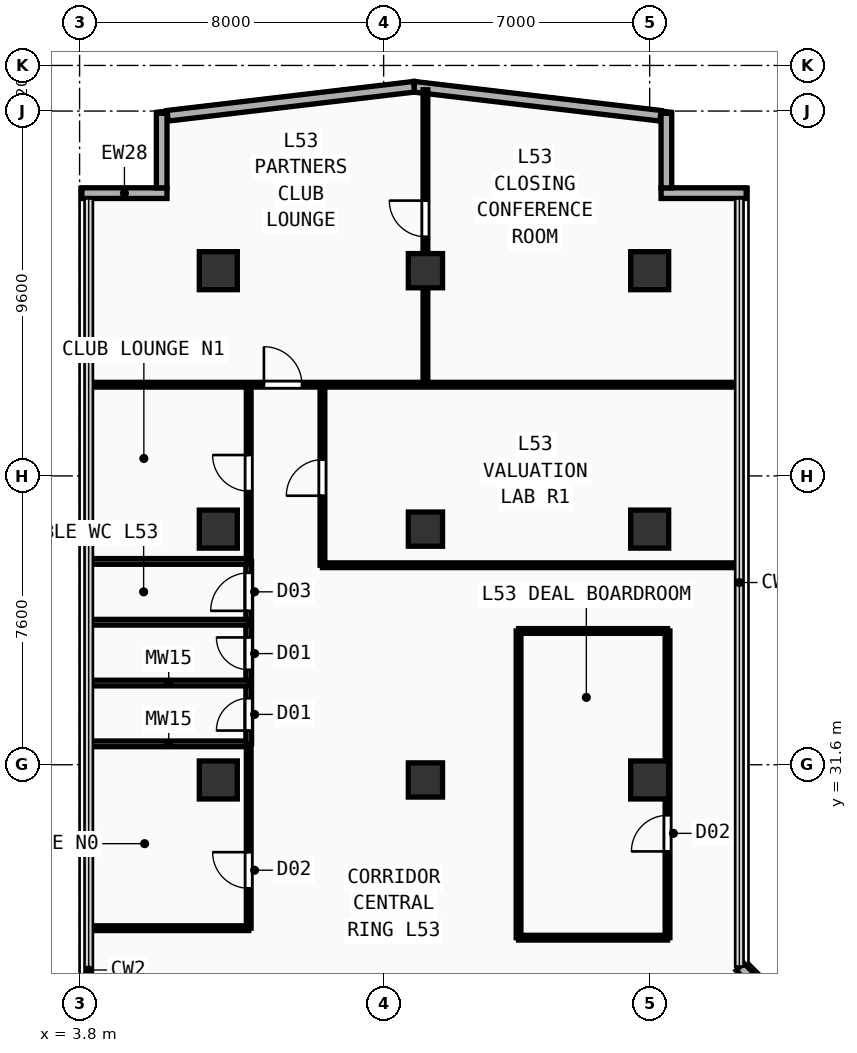
"""IFC4 building model, lengths in metres.
Left out: names, types, materials, properties, quantities, classifications, styles, units other than length and angle.
Written with IfcOpenShell. Run it as: python <this file> out.ifc"""

import sys

from ifc_helpers import new_model, si_unit, direction, frame, frame_2d, origin, origin_2d, place, context, subcontext, project, spatial, rectangle, extrude, element, fill, save


model = new_model("IFC4")
c1 = context("Model", 3, precision=1e-05, world=origin(), true_north=direction((0.0, 1.0)))
c2 = subcontext(c1, "Body", "Model", "MODEL_VIEW")
j1 = project(units=[si_unit("LENGTHUNIT", "METRE"), si_unit("PLANEANGLEUNIT", "RADIAN")], contexts=[c1])
p1 = place(None, origin())
s1 = spatial("IfcSite", under=j1, at=p1, CompositionType="ELEMENT")
p2 = place(p1, origin())
s2 = spatial("IfcBuilding", under=s1, at=p2, CompositionType="ELEMENT")
p3 = place(p2, frame((0.0, 0.0, 208.3)))
s3 = spatial("IfcBuildingStorey", under=s2, at=p3, CompositionType="ELEMENT", Elevation=208.3)
for number, where, z_axis, x_axis in (
    (1, (7.45, 31.2, 0.0), (0.0, 0.0, 1.0), (1.0, 0.0, 0.0)),
    (2, (7.45, 37.8, 0.0), (0.0, 0.0, 1.0), (1.0, 0.0, 0.0)),
    (3, (7.45, 44.6, 0.0), (0.0, 0.0, 1.0), (1.0, 0.0, 0.0)),
    (4, (18.8, 31.2, 0.0), (0.0, 0.0, 1.0), (1.0, 0.0, 0.0)),
    (5, (18.8, 37.8, 0.0), (0.0, 0.0, 1.0), (1.0, 0.0, 0.0)),
    (6, (18.8, 44.6, 0.0), (0.0, 0.0, 1.0), (1.0, 0.0, 0.0)),
):
    element("IfcColumn", number, at=place(p3, frame(where, z_axis=z_axis, x_axis=x_axis)), inside=s3, PredefinedType="COLUMN", context=c2, shape_type="SweptSolid", body=[
        extrude(rectangle(XDim=1.0, YDim=1.0, at=origin_2d()), origin(), (0.0, 0.0, 1.0), 3.56),
    ])
for number, where, z_axis, x_axis in (
    (7, (12.9, 31.2, 0.0), (0.0, 0.0, 1.0), (1.0, 0.0, 0.0)),
    (8, (12.9, 37.8, 0.0), (0.0, 0.0, 1.0), (1.0, 0.0, 0.0)),
    (9, (12.9, 44.6, 0.0), (0.0, 0.0, 1.0), (1.0, 0.0, 0.0)),
):
    element("IfcColumn", number, at=place(p3, frame(where, z_axis=z_axis, x_axis=x_axis)), inside=s3, PredefinedType="COLUMN", context=c2, shape_type="SweptSolid", body=[
        extrude(rectangle(XDim=0.9, YDim=0.9, at=origin_2d()), origin(), (0.0, 0.0, 1.0), 3.56),
    ])
p4 = place(p3, frame((19.1, 46.64, 0.0), z_axis=(0.0, 0.0, 1.0), x_axis=(1.0, 0.0, 0.0)))
e10 = element("IfcWall", 10, at=p4, inside=s3, PredefinedType="SOLIDWALL", context=c2, shape_type="SweptSolid", body=[
    extrude(rectangle(XDim=2.24, YDim=0.28, at=frame_2d((1.12, 0.0))), origin(), (0.0, 0.0, 1.0), 3.56),
])
p5 = place(p3, frame((19.24, 46.78, 0.0), z_axis=(0.0, 0.0, 1.0), x_axis=(0.0, 1.0, 0.0)))
e11 = element("IfcWall", 11, at=p5, inside=s3, PredefinedType="SOLIDWALL", context=c2, shape_type="SweptSolid", body=[
    extrude(rectangle(XDim=1.96, YDim=0.28, at=frame_2d((0.98, 0.0))), origin(), (0.0, 0.0, 1.0), 3.56),
])
p6 = place(p3, frame((3.86, 46.64, 0.0), z_axis=(0.0, 0.0, 1.0), x_axis=(1.0, 0.0, 0.0)))
e12 = element("IfcWall", 12, at=p6, inside=s3, PredefinedType="SOLIDWALL", context=c2, shape_type="SweptSolid", body=[
    extrude(rectangle(XDim=2.24, YDim=0.28, at=frame_2d((1.12, 0.0))), origin(), (0.0, 0.0, 1.0), 3.56),
])
p7 = place(p3, frame((5.96, 46.78, 0.0), z_axis=(0.0, 0.0, 1.0), x_axis=(0.0, 1.0, 0.0)))
e13 = element("IfcWall", 13, at=p7, inside=s3, PredefinedType="SOLIDWALL", context=c2, shape_type="SweptSolid", body=[
    extrude(rectangle(XDim=1.96, YDim=0.28, at=frame_2d((0.98, 0.0))), origin(), (0.0, 0.0, 1.0), 3.56),
])
p8 = place(p3, frame((27.685, 19.775, 0.0), z_axis=(0.0, 0.0, 1.0), x_axis=(-0.707106781187, 0.707106781187, 0.0)))
e14 = element("IfcWall", 14, at=p8, inside=s3, PredefinedType="SOLIDWALL", context=c2, shape_type="SweptSolid", body=[
    extrude(rectangle(XDim=9.207, YDim=0.28, at=frame_2d((4.603, 0.0))), origin(), (0.0, 0.0, 1.0), 3.56),
])
for number, where, z_axis, x_axis in (
    (15, (19.083, 48.676, 0.0), (0.0, 0.0, 1.0), (-0.993, 0.117, 0.0)),
    (16, (12.599, 49.439, 0.0), (0.0, 0.0, 1.0), (-0.993, -0.117, 0.0)),
):
    element("IfcWall", number, at=place(p3, frame(where, z_axis=z_axis, x_axis=x_axis)), inside=s3, PredefinedType="SOLIDWALL", context=c2, shape_type="SweptSolid", body=[
        extrude(rectangle(XDim=6.527, YDim=0.28, at=frame_2d((3.263, 0.0))), origin(), (0.0, 0.0, 1.0), 3.56),
    ])
for number, where, z_axis, x_axis in (
    (17, (15.35, 27.05, 0.0), (0.0, 0.0, 1.0), (1.0, 0.0, 0.0)),
    (18, (15.35, 35.12, 0.0), (0.0, 0.0, 1.0), (1.0, 0.0, 0.0)),
):
    element("IfcWall", number, at=place(p3, frame(where, z_axis=z_axis, x_axis=x_axis)), inside=s3, PredefinedType="PARTITIONING", context=c2, shape_type="SweptSolid", body=[
        extrude(rectangle(XDim=3.92, YDim=0.125, at=frame_2d((1.96, 0.0))), origin(), (0.0, 0.0, 1.0), 3.56),
    ])
p9 = place(p3, frame((15.35, 27.05, 0.0), z_axis=(0.0, 0.0, 1.0), x_axis=(0.0, 1.0, 0.0)))
e19 = element("IfcWall", 19, at=p9, inside=s3, PredefinedType="PARTITIONING", context=c2, shape_type="SweptSolid", body=[
    extrude(rectangle(XDim=8.07, YDim=0.125, at=frame_2d((4.035, 0.0))), origin(), (0.0, 0.0, 1.0), 3.56),
])
p10 = place(p3, frame((19.27, 27.05, 0.0), z_axis=(0.0, 0.0, 1.0), x_axis=(0.0, 1.0, 0.0)))
e20 = element("IfcWall", 20, at=p10, inside=s3, PredefinedType="PARTITIONING", context=c2, shape_type="SweptSolid", body=[
    extrude(rectangle(XDim=8.07, YDim=0.125, at=frame_2d((4.035, 0.0))), origin(), (0.0, 0.0, 1.0), 3.56),
])
p11 = place(p10, frame((2.27, 0.0, 0.0)))
e21 = element("IfcOpeningElement", 21, at=p11, cuts=e20, PredefinedType="OPENING", context=c2, shape_type="SweptSolid", body=[
    extrude(rectangle(XDim=0.95, YDim=2.15, at=frame_2d((0.475, 1.075))), frame((0.0, 0.073, 0.0), z_axis=(0.0, -1.0, 0.0), x_axis=(1.0, 0.0, 0.0)), (0.0, 0.0, 1.0), 0.145),
])
p12 = place(p3, frame((8.25, 27.3, 0.0), z_axis=(0.0, 0.0, 1.0), x_axis=(0.0, 1.0, 0.0)))
e22 = element("IfcWall", 22, at=p12, inside=s3, PredefinedType="PARTITIONING", context=c2, shape_type="SweptSolid", body=[
    extrude(rectangle(XDim=4.85, YDim=0.125, at=frame_2d((2.425, 0.0))), origin(), (0.0, 0.0, 1.0), 3.56),
])
p13 = place(p12, frame((1.05, 0.0, 0.0)))
e23 = element("IfcOpeningElement", 23, at=p13, cuts=e22, PredefinedType="OPENING", context=c2, shape_type="SweptSolid", body=[
    extrude(rectangle(XDim=0.95, YDim=2.15, at=frame_2d((0.475, 1.075))), frame((0.0, 0.073, 0.0), z_axis=(0.0, -1.0, 0.0), x_axis=(1.0, 0.0, 0.0)), (0.0, 0.0, 1.0), 0.145),
])
p14 = place(p3, frame((4.04, 27.3, 0.0), z_axis=(0.0, 0.0, 1.0), x_axis=(1.0, 0.0, 0.0)))
e24 = element("IfcWall", 24, at=p14, inside=s3, PredefinedType="PARTITIONING", context=c2, shape_type="SweptSolid", body=[
    extrude(rectangle(XDim=4.21, YDim=0.125, at=frame_2d((2.105, 0.0))), origin(), (0.0, 0.0, 1.0), 3.56),
])
p15 = place(p3, frame((4.04, 32.15, 0.0), z_axis=(0.0, 0.0, 1.0), x_axis=(1.0, 0.0, 0.0)))
e25 = element("IfcWall", 25, at=p15, inside=s3, PredefinedType="PLUMBINGWALL", context=c2, shape_type="SweptSolid", body=[
    extrude(rectangle(XDim=4.21, YDim=0.15, at=frame_2d((2.105, 0.0))), origin(), (0.0, 0.0, 1.0), 3.56),
])
p16 = place(p3, frame((8.25, 32.15, 0.0), z_axis=(0.0, 0.0, 1.0), x_axis=(0.0, 1.0, 0.0)))
e26 = element("IfcWall", 26, at=p16, inside=s3, PredefinedType="PLUMBINGWALL", context=c2, shape_type="SweptSolid", body=[
    extrude(rectangle(XDim=4.8, YDim=0.15, at=frame_2d((2.4, 0.0))), origin(), (0.0, 0.0, 1.0), 3.56),
])
p17 = place(p16, frame((0.35, 0.0, 0.0)))
e27 = element("IfcOpeningElement", 27, at=p17, cuts=e26, PredefinedType="OPENING", context=c2, shape_type="SweptSolid", body=[
    extrude(rectangle(XDim=0.85, YDim=2.15, at=frame_2d((0.425, 1.075))), frame((0.0, 0.085, 0.0), z_axis=(0.0, -1.0, 0.0), x_axis=(1.0, 0.0, 0.0)), (0.0, 0.0, 1.0), 0.17),
])
p18 = place(p16, frame((1.95, 0.0, 0.0)))
e28 = element("IfcOpeningElement", 28, at=p18, cuts=e26, PredefinedType="OPENING", context=c2, shape_type="SweptSolid", body=[
    extrude(rectangle(XDim=0.85, YDim=2.15, at=frame_2d((0.425, 1.075))), frame((0.0, 0.085, 0.0), z_axis=(0.0, -1.0, 0.0), x_axis=(1.0, 0.0, 0.0)), (0.0, 0.0, 1.0), 0.17),
])
p19 = place(p16, frame((3.5, 0.0, 0.0)))
e29 = element("IfcOpeningElement", 29, at=p19, cuts=e26, PredefinedType="OPENING", context=c2, shape_type="SweptSolid", body=[
    extrude(rectangle(XDim=1.0, YDim=2.2, at=frame_2d((0.5, 1.1))), frame((0.0, 0.085, 0.0), z_axis=(0.0, -1.0, 0.0), x_axis=(1.0, 0.0, 0.0)), (0.0, 0.0, 1.0), 0.17),
])
for number, where, z_axis, x_axis in (
    (30, (4.04, 33.75, 0.0), (0.0, 0.0, 1.0), (1.0, 0.0, 0.0)),
    (31, (4.04, 35.35, 0.0), (0.0, 0.0, 1.0), (1.0, 0.0, 0.0)),
):
    element("IfcWall", number, at=place(p3, frame(where, z_axis=z_axis, x_axis=x_axis)), inside=s3, PredefinedType="PLUMBINGWALL", context=c2, shape_type="SweptSolid", body=[
        extrude(rectangle(XDim=4.21, YDim=0.15, at=frame_2d((2.105, 0.0))), origin(), (0.0, 0.0, 1.0), 3.2),
    ])
p20 = place(p3, frame((4.04, 36.95, 0.0), z_axis=(0.0, 0.0, 1.0), x_axis=(1.0, 0.0, 0.0)))
e32 = element("IfcWall", 32, at=p20, inside=s3, PredefinedType="PLUMBINGWALL", context=c2, shape_type="SweptSolid", body=[
    extrude(rectangle(XDim=4.21, YDim=0.15, at=frame_2d((2.105, 0.0))), origin(), (0.0, 0.0, 1.0), 3.56),
])
p21 = place(p3, frame((8.25, 36.95, 0.0), z_axis=(0.0, 0.0, 1.0), x_axis=(0.0, 1.0, 0.0)))
e33 = element("IfcWall", 33, at=p21, inside=s3, PredefinedType="PARTITIONING", context=c2, shape_type="SweptSolid", body=[
    extrude(rectangle(XDim=4.65, YDim=0.125, at=frame_2d((2.325, 0.0))), origin(), (0.0, 0.0, 1.0), 3.56),
])
p22 = place(p21, frame((1.85, 0.0, 0.0)))
e34 = element("IfcOpeningElement", 34, at=p22, cuts=e33, PredefinedType="OPENING", context=c2, shape_type="SweptSolid", body=[
    extrude(rectangle(XDim=0.95, YDim=2.15, at=frame_2d((0.475, 1.075))), frame((0.0, 0.073, 0.0), z_axis=(0.0, -1.0, 0.0), x_axis=(1.0, 0.0, 0.0)), (0.0, 0.0, 1.0), 0.145),
])
p23 = place(p3, frame((4.04, 41.6, 0.0), z_axis=(0.0, 0.0, 1.0), x_axis=(1.0, 0.0, 0.0)))
e35 = element("IfcWall", 35, at=p23, inside=s3, PredefinedType="PARTITIONING", context=c2, shape_type="SweptSolid", body=[
    extrude(rectangle(XDim=17.12, YDim=0.125, at=frame_2d((8.56, 0.0))), origin(), (0.0, 0.0, 1.0), 3.56),
])
p24 = place(p23, frame((4.61, 0.0, 0.0)))
e36 = element("IfcOpeningElement", 36, at=p24, cuts=e35, PredefinedType="OPENING", context=c2, shape_type="SweptSolid", body=[
    extrude(rectangle(XDim=1.0, YDim=2.2, at=frame_2d((0.5, 1.1))), frame((0.0, 0.073, 0.0), z_axis=(0.0, -1.0, 0.0), x_axis=(1.0, 0.0, 0.0)), (0.0, 0.0, 1.0), 0.145),
])
p25 = place(p3, frame((12.9, 41.6, 0.0), z_axis=(0.0, 0.0, 1.0), x_axis=(0.0, 1.0, 0.0)))
e37 = element("IfcWall", 37, at=p25, inside=s3, PredefinedType="PARTITIONING", context=c2, shape_type="SweptSolid", body=[
    extrude(rectangle(XDim=7.76, YDim=0.125, at=frame_2d((3.88, 0.0))), origin(), (0.0, 0.0, 1.0), 3.16),
])
p26 = place(p25, frame((3.894, 0.0, 0.0)))
e38 = element("IfcOpeningElement", 38, at=p26, cuts=e37, PredefinedType="OPENING", context=c2, shape_type="SweptSolid", body=[
    extrude(rectangle(XDim=0.95, YDim=2.15, at=frame_2d((0.475, 1.075))), frame((0.0, 0.073, 0.0), z_axis=(0.0, -1.0, 0.0), x_axis=(1.0, 0.0, 0.0)), (0.0, 0.0, 1.0), 0.145),
])
p27 = place(p3, frame((10.19, 36.85, 0.0), z_axis=(0.0, 0.0, 1.0), x_axis=(1.0, 0.0, 0.0)))
e39 = element("IfcWall", 39, at=p27, inside=s3, PredefinedType="PARTITIONING", context=c2, shape_type="SweptSolid", body=[
    extrude(rectangle(XDim=10.97, YDim=0.125, at=frame_2d((5.485, 0.0))), origin(), (0.0, 0.0, 1.0), 3.56),
])
p28 = place(p3, frame((10.19, 36.85, 0.0), z_axis=(0.0, 0.0, 1.0), x_axis=(0.0, 1.0, 0.0)))
e40 = element("IfcWall", 40, at=p28, inside=s3, PredefinedType="PARTITIONING", context=c2, shape_type="SweptSolid", body=[
    extrude(rectangle(XDim=4.75, YDim=0.125, at=frame_2d((2.375, 0.0))), origin(), (0.0, 0.0, 1.0), 3.56),
])
p29 = place(p28, frame((1.829, 0.0, 0.0)))
e41 = element("IfcOpeningElement", 41, at=p29, cuts=e40, PredefinedType="OPENING", context=c2, shape_type="SweptSolid", body=[
    extrude(rectangle(XDim=0.95, YDim=2.15, at=frame_2d((0.475, 1.075))), frame((0.0, 0.073, 0.0), z_axis=(0.0, -1.0, 0.0), x_axis=(1.0, 0.0, 0.0)), (0.0, 0.0, 1.0), 0.145),
])
p30 = place(p11, origin())
e42 = element("IfcDoor", 42, at=p30, inside=s3, OperationType="SINGLE_SWING_LEFT", PredefinedType="DOOR", context=c2, shape_type="SweptSolid", body=[
    extrude(rectangle(XDim=0.95, YDim=2.15, at=frame_2d((0.475, 1.075))), frame((0.0, 0.025, 0.0), z_axis=(0.0, -1.0, 0.0), x_axis=(1.0, 0.0, 0.0)), (0.0, 0.0, 1.0), 0.05),
])
fill(e21, e42)
p31 = place(p13, origin())
e43 = element("IfcDoor", 43, at=p31, inside=s3, OperationType="SINGLE_SWING_RIGHT", PredefinedType="DOOR", context=c2, shape_type="SweptSolid", body=[
    extrude(rectangle(XDim=0.95, YDim=2.15, at=frame_2d((0.475, 1.075))), frame((0.0, 0.025, 0.0), z_axis=(0.0, -1.0, 0.0), x_axis=(1.0, 0.0, 0.0)), (0.0, 0.0, 1.0), 0.05),
])
fill(e23, e43)
p32 = place(p17, origin())
e44 = element("IfcDoor", 44, at=p32, inside=s3, OperationType="SINGLE_SWING_LEFT", PredefinedType="DOOR", context=c2, shape_type="SweptSolid", body=[
    extrude(rectangle(XDim=0.85, YDim=2.15, at=frame_2d((0.425, 1.075))), frame((0.0, 0.025, 0.0), z_axis=(0.0, -1.0, 0.0), x_axis=(1.0, 0.0, 0.0)), (0.0, 0.0, 1.0), 0.05),
])
fill(e27, e44)
p33 = place(p18, origin())
e45 = element("IfcDoor", 45, at=p33, inside=s3, OperationType="SINGLE_SWING_RIGHT", PredefinedType="DOOR", context=c2, shape_type="SweptSolid", body=[
    extrude(rectangle(XDim=0.85, YDim=2.15, at=frame_2d((0.425, 1.075))), frame((0.0, 0.025, 0.0), z_axis=(0.0, -1.0, 0.0), x_axis=(1.0, 0.0, 0.0)), (0.0, 0.0, 1.0), 0.05),
])
fill(e28, e45)
p34 = place(p19, origin())
e46 = element("IfcDoor", 46, at=p34, inside=s3, OperationType="SINGLE_SWING_LEFT", PredefinedType="DOOR", context=c2, shape_type="SweptSolid", body=[
    extrude(rectangle(XDim=1.0, YDim=2.2, at=frame_2d((0.5, 1.1))), frame((0.0, 0.025, 0.0), z_axis=(0.0, -1.0, 0.0), x_axis=(1.0, 0.0, 0.0)), (0.0, 0.0, 1.0), 0.05),
])
fill(e29, e46)
p35 = place(p22, origin())
e47 = element("IfcDoor", 47, at=p35, inside=s3, OperationType="SINGLE_SWING_RIGHT", PredefinedType="DOOR", context=c2, shape_type="SweptSolid", body=[
    extrude(rectangle(XDim=0.95, YDim=2.15, at=frame_2d((0.475, 1.075))), frame((0.0, 0.025, 0.0), z_axis=(0.0, -1.0, 0.0), x_axis=(1.0, 0.0, 0.0)), (0.0, 0.0, 1.0), 0.05),
])
fill(e34, e47)
p36 = place(p24, origin())
e48 = element("IfcDoor", 48, at=p36, inside=s3, OperationType="SINGLE_SWING_LEFT", PredefinedType="DOOR", context=c2, shape_type="SweptSolid", body=[
    extrude(rectangle(XDim=1.0, YDim=2.2, at=frame_2d((0.5, 1.1))), frame((0.0, 0.025, 0.0), z_axis=(0.0, -1.0, 0.0), x_axis=(1.0, 0.0, 0.0)), (0.0, 0.0, 1.0), 0.05),
])
fill(e36, e48)
p37 = place(p26, origin())
e49 = element("IfcDoor", 49, at=p37, inside=s3, OperationType="SINGLE_SWING_RIGHT", PredefinedType="DOOR", context=c2, shape_type="SweptSolid", body=[
    extrude(rectangle(XDim=0.95, YDim=2.15, at=frame_2d((0.475, 1.075))), frame((0.0, 0.025, 0.0), z_axis=(0.0, -1.0, 0.0), x_axis=(1.0, 0.0, 0.0)), (0.0, 0.0, 1.0), 0.05),
])
fill(e38, e49)
p38 = place(p29, origin())
e50 = element("IfcDoor", 50, at=p38, inside=s3, OperationType="SINGLE_SWING_LEFT", PredefinedType="DOOR", context=c2, shape_type="SweptSolid", body=[
    extrude(rectangle(XDim=0.95, YDim=2.15, at=frame_2d((0.475, 1.075))), frame((0.0, 0.025, 0.0), z_axis=(0.0, -1.0, 0.0), x_axis=(1.0, 0.0, 0.0)), (0.0, 0.0, 1.0), 0.05),
])
fill(e41, e50)
save(model, sys.argv[1])
